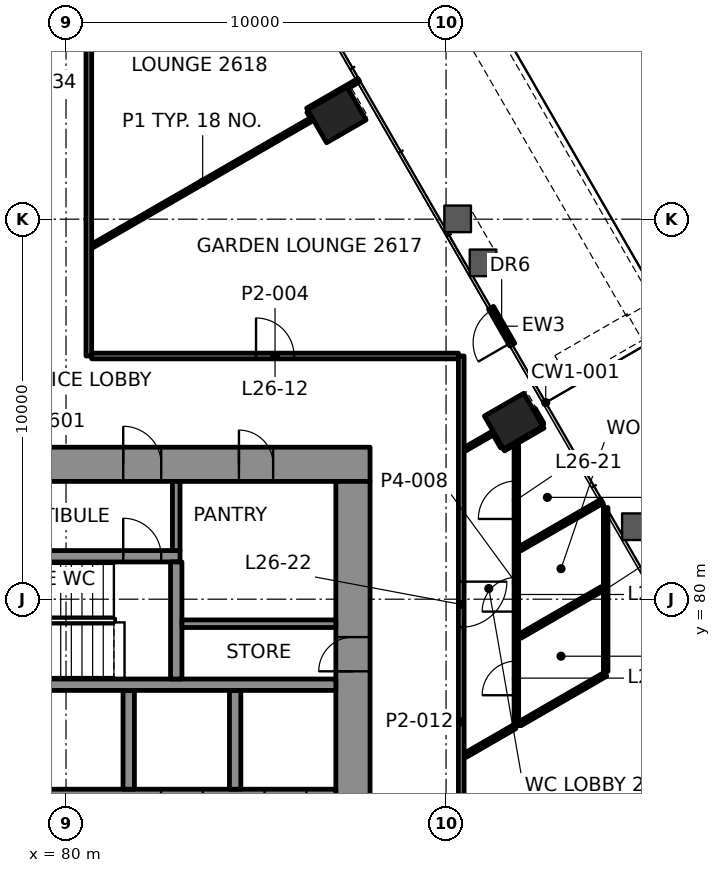
"""IFC4 building model, lengths in metres.
Left out: names, types, materials, properties, quantities, classifications, styles, units other than length and angle.
Written with IfcOpenShell. Run it as: python <this file> out.ifc"""

import sys

from ifc_helpers import new_model, si_unit, direction, frame, frame_2d, origin, origin_2d, place, context, subcontext, project, spatial, rectangle, extrude, element, fill, save


model = new_model("IFC4")
c1 = context("Model", 3, precision=1e-05, world=origin(), true_north=direction((0.0, 1.0)))
c2 = subcontext(c1, "Body", "Model", "MODEL_VIEW")
j1 = project(units=[si_unit("LENGTHUNIT", "METRE"), si_unit("PLANEANGLEUNIT", "RADIAN")], contexts=[c1])
p1 = place(None, origin())
s1 = spatial("IfcSite", under=j1, at=p1, CompositionType="ELEMENT")
p2 = place(p1, origin())
s2 = spatial("IfcBuilding", under=s1, at=p2, CompositionType="ELEMENT")
p3 = place(p2, frame((0.0, 0.0, 115.6)))
s3 = spatial("IfcBuildingStorey", under=s2, at=p3, CompositionType="ELEMENT", Elevation=115.6)
for number, where, z_axis, x_axis in (
    (1, (91.778, 84.687, -0.0), (0.0, 0.0, 1.0), (-0.5, 0.866, 0.0)),
    (2, (87.126, 92.745, -0.0), (0.0, 0.0, 1.0), (-0.5, 0.866, 0.0)),
):
    element("IfcColumn", number, at=place(p3, frame(where, z_axis=z_axis, x_axis=x_axis)), inside=s3, PredefinedType="COLUMN", context=c2, shape_type="SweptSolid", body=[
        extrude(rectangle(XDim=1.0, YDim=1.2, at=origin_2d()), origin(), (0.0, 0.0, 1.0), 4.2),
    ])
p4 = place(p3, frame((62.9, 83.55, 0.0), z_axis=(0.0, 0.0, 1.0), x_axis=(1.0, 0.0, 0.0)))
e3 = element("IfcWall", 3, at=p4, inside=s3, PredefinedType="SHEAR", context=c2, shape_type="SweptSolid", body=[
    extrude(rectangle(XDim=25.1, YDim=0.9, at=frame_2d((12.55, 0.0))), origin(), (0.0, 0.0, 1.0), 4.0),
])
p5 = place(p4, frame((4.795, 0.0, 0.0)))
e4 = element("IfcOpeningElement", 4, at=p5, cuts=e3, PredefinedType="OPENING", context=c2, shape_type="SweptSolid", body=[
    extrude(rectangle(XDim=1.0, YDim=2.1, at=frame_2d((0.5, 1.05))), frame((0.0, 0.46, 0.0), z_axis=(0.0, -1.0, 0.0), x_axis=(1.0, 0.0, 0.0)), (0.0, 0.0, 1.0), 0.92),
])
p6 = place(p4, frame((18.605, 0.0, 0.0)))
e5 = element("IfcOpeningElement", 5, at=p6, cuts=e3, PredefinedType="OPENING", context=c2, shape_type="SweptSolid", body=[
    extrude(rectangle(XDim=1.0, YDim=2.1, at=frame_2d((0.5, 1.05))), frame((0.0, 0.46, 0.0), z_axis=(0.0, -1.0, 0.0), x_axis=(1.0, 0.0, 0.0)), (0.0, 0.0, 1.0), 0.92),
])
p7 = place(p4, frame((2.55, 0.0, 0.0)))
e6 = element("IfcOpeningElement", 6, at=p7, cuts=e3, PredefinedType="OPENING", context=c2, shape_type="SweptSolid", body=[
    extrude(rectangle(XDim=0.9, YDim=2.1, at=frame_2d((0.45, 1.05))), frame((0.0, 0.46, 0.0), z_axis=(0.0, -1.0, 0.0), x_axis=(1.0, 0.0, 0.0)), (0.0, 0.0, 1.0), 0.92),
])
p8 = place(p4, frame((11.75, 0.0, 0.0)))
e7 = element("IfcOpeningElement", 7, at=p8, cuts=e3, PredefinedType="OPENING", context=c2, shape_type="SweptSolid", body=[
    extrude(rectangle(XDim=0.9, YDim=2.1, at=frame_2d((0.45, 1.05))), frame((0.0, 0.46, 0.0), z_axis=(0.0, -1.0, 0.0), x_axis=(1.0, 0.0, 0.0)), (0.0, 0.0, 1.0), 0.92),
])
p9 = place(p4, frame((21.65, 0.0, 0.0)))
e8 = element("IfcOpeningElement", 8, at=p9, cuts=e3, PredefinedType="OPENING", context=c2, shape_type="SweptSolid", body=[
    extrude(rectangle(XDim=0.9, YDim=2.1, at=frame_2d((0.45, 1.05))), frame((0.0, 0.46, 0.0), z_axis=(0.0, -1.0, 0.0), x_axis=(1.0, 0.0, 0.0)), (0.0, 0.0, 1.0), 0.92),
])
p10 = place(p3, frame((87.55, 66.9, 0.0), z_axis=(0.0, 0.0, 1.0), x_axis=(0.0, 1.0, 0.0)))
e9 = element("IfcWall", 9, at=p10, inside=s3, PredefinedType="SHEAR", context=c2, shape_type="SweptSolid", body=[
    extrude(rectangle(XDim=16.2, YDim=0.9, at=frame_2d((8.1, 0.0))), origin(), (0.0, 0.0, 1.0), 4.0),
])
p11 = place(p10, frame((5.5, 0.0, 0.0)))
e10 = element("IfcOpeningElement", 10, at=p11, cuts=e9, PredefinedType="OPENING", context=c2, shape_type="SweptSolid", body=[
    extrude(rectangle(XDim=1.8, YDim=2.1, at=frame_2d((0.9, 1.05))), frame((0.0, 0.46, 0.0), z_axis=(0.0, -1.0, 0.0), x_axis=(1.0, 0.0, 0.0)), (0.0, 0.0, 1.0), 0.92),
])
p12 = place(p10, frame((11.202, 0.0, 0.0)))
e11 = element("IfcOpeningElement", 11, at=p12, cuts=e9, PredefinedType="OPENING", context=c2, shape_type="SweptSolid", body=[
    extrude(rectangle(XDim=0.9, YDim=2.1, at=frame_2d((0.45, 1.05))), frame((0.0, 0.46, 0.0), z_axis=(0.0, -1.0, 0.0), x_axis=(1.0, 0.0, 0.0)), (0.0, 0.0, 1.0), 0.92),
])
p13 = place(p3, frame((70.3, 74.85, 0.0), z_axis=(0.0, 0.0, 1.0), x_axis=(1.0, 0.0, 0.0)))
e12 = element("IfcWall", 12, at=p13, inside=s3, PredefinedType="SHEAR", context=c2, shape_type="SweptSolid", body=[
    extrude(rectangle(XDim=16.8, YDim=0.3, at=frame_2d((8.4, 0.0))), origin(), (0.0, 0.0, 1.0), 4.0),
])
p14 = place(p13, frame((3.8, 0.0, 0.0)))
e13 = element("IfcOpeningElement", 13, at=p14, cuts=e12, PredefinedType="OPENING", context=c2, shape_type="SweptSolid", body=[
    extrude(rectangle(XDim=1.1, YDim=2.1, at=frame_2d((0.55, 1.05))), frame((0.0, 0.16, 0.0), z_axis=(0.0, -1.0, 0.0), x_axis=(1.0, 0.0, 0.0)), (0.0, 0.0, 1.0), 0.32),
])
p15 = place(p13, frame((12.2, 0.0, 0.0)))
e14 = element("IfcOpeningElement", 14, at=p15, cuts=e12, PredefinedType="OPENING", context=c2, shape_type="SweptSolid", body=[
    extrude(rectangle(XDim=1.1, YDim=2.1, at=frame_2d((0.55, 1.05))), frame((0.0, 0.16, 0.0), z_axis=(0.0, -1.0, 0.0), x_axis=(1.0, 0.0, 0.0)), (0.0, 0.0, 1.0), 0.32),
])
p16 = place(p13, frame((14.925, 0.0, 0.0)))
e15 = element("IfcOpeningElement", 15, at=p16, cuts=e12, PredefinedType="OPENING", context=c2, shape_type="SweptSolid", body=[
    extrude(rectangle(XDim=1.1, YDim=2.1, at=frame_2d((0.55, 1.05))), frame((0.0, 0.16, 0.0), z_axis=(0.0, -1.0, 0.0), x_axis=(1.0, 0.0, 0.0)), (0.0, 0.0, 1.0), 0.32),
])
for number, where, z_axis, x_axis in (
    (16, (81.65, 75.0, 0.0), (0.0, 0.0, 1.0), (0.0, 1.0, 0.0)),
    (17, (84.45, 75.0, 0.0), (0.0, 0.0, 1.0), (0.0, 1.0, 0.0)),
):
    element("IfcWall", number, at=place(p3, frame(where, z_axis=z_axis, x_axis=x_axis)), inside=s3, PredefinedType="SHEAR", context=c2, shape_type="SweptSolid", body=[
        extrude(rectangle(XDim=2.6, YDim=0.3, at=frame_2d((1.3, 0.0))), origin(), (0.0, 0.0, 1.0), 4.0),
    ])
p17 = place(p3, frame((64.35, 77.75, 0.0), z_axis=(0.0, 0.0, 1.0), x_axis=(1.0, 0.0, 0.0)))
e18 = element("IfcWall", 18, at=p17, inside=s3, PredefinedType="SHEAR", context=c2, shape_type="SweptSolid", body=[
    extrude(rectangle(XDim=22.75, YDim=0.3, at=frame_2d((11.375, 0.0))), origin(), (0.0, 0.0, 1.0), 4.0),
])
p18 = place(p17, frame((3.345, 0.0, 0.0)))
e19 = element("IfcOpeningElement", 19, at=p18, cuts=e18, PredefinedType="OPENING", context=c2, shape_type="SweptSolid", body=[
    extrude(rectangle(XDim=1.0, YDim=2.1, at=frame_2d((0.5, 1.05))), frame((0.0, 0.16, 0.0), z_axis=(0.0, -1.0, 0.0), x_axis=(1.0, 0.0, 0.0)), (0.0, 0.0, 1.0), 0.32),
])
p19 = place(p3, frame((76.14, 81.13, 0.0), z_axis=(0.0, 0.0, 1.0), x_axis=(1.0, 0.0, 0.0)))
e20 = element("IfcWall", 20, at=p19, inside=s3, PredefinedType="SHEAR", context=c2, shape_type="SweptSolid", body=[
    extrude(rectangle(XDim=6.86, YDim=0.3, at=frame_2d((3.43, 0.0))), origin(), (0.0, 0.0, 1.0), 4.0),
])
p20 = place(p19, frame((5.365, 0.0, 0.0)))
e21 = element("IfcOpeningElement", 21, at=p20, cuts=e20, PredefinedType="OPENING", context=c2, shape_type="SweptSolid", body=[
    extrude(rectangle(XDim=1.0, YDim=2.1, at=frame_2d((0.5, 1.05))), frame((0.0, 0.16, 0.0), z_axis=(0.0, -1.0, 0.0), x_axis=(1.0, 0.0, 0.0)), (0.0, 0.0, 1.0), 0.32),
])
p21 = place(p3, frame((82.9, 77.9, 0.0), z_axis=(0.0, 0.0, 1.0), x_axis=(0.0, 1.0, 0.0)))
e22 = element("IfcWall", 22, at=p21, inside=s3, PredefinedType="SHEAR", context=c2, shape_type="SweptSolid", body=[
    extrude(rectangle(XDim=3.08, YDim=0.3, at=frame_2d((1.54, 0.0))), origin(), (0.0, 0.0, 1.0), 4.0),
])
p22 = place(p3, frame((80.675, 86.4, 0.0), z_axis=(0.0, 0.0, 1.0), x_axis=(1.0, 0.0, 0.0)))
e23 = element("IfcWall", 23, at=p22, inside=s3, PredefinedType="PARTITIONING", context=c2, shape_type="SweptSolid", body=[
    extrude(rectangle(XDim=9.649, YDim=0.15, at=frame_2d((4.825, 0.0))), origin(), (0.0, 0.0, 1.0), 3.4),
])
p23 = place(p22, frame((4.325, 0.0, 0.0)))
e24 = element("IfcOpeningElement", 24, at=p23, cuts=e23, PredefinedType="OPENING", context=c2, shape_type="SweptSolid", body=[
    extrude(rectangle(XDim=1.0, YDim=2.1, at=frame_2d((0.5, 1.05))), frame((0.0, 0.085, 0.0), z_axis=(0.0, -1.0, 0.0), x_axis=(1.0, 0.0, 0.0)), (0.0, 0.0, 1.0), 0.17),
])
p24 = place(p3, frame((90.51, 75.896, 0.0), z_axis=(0.0, 0.0, 1.0), x_axis=(0.866055123991, 0.49994851956, 0.0)))
e25 = element("IfcWall", 25, at=p24, inside=s3, PredefinedType="PARTITIONING", context=c2, shape_type="SweptSolid", body=[
    extrude(rectangle(XDim=1.496, YDim=0.12, at=frame_2d((0.748, 0.0))), origin(), (0.0, 0.0, 1.0), 3.4),
])
p25 = place(p3, frame((91.945, 79.027, 0.0), z_axis=(0.0, 0.0, 1.0), x_axis=(0.86603079437, 0.499990663115, 0.0)))
e26 = element("IfcWall", 26, at=p25, inside=s3, PredefinedType="PARTITIONING", context=c2, shape_type="SweptSolid", body=[
    extrude(rectangle(XDim=2.495, YDim=0.12, at=frame_2d((1.248, 0.0))), origin(), (0.0, 0.0, 1.0), 3.4),
])
p26 = place(p3, frame((91.945, 81.329, 0.0), z_axis=(0.0, 0.0, 1.0), x_axis=(0.866024239756, 0.50000201615, 0.0)))
e27 = element("IfcWall", 27, at=p26, inside=s3, PredefinedType="PARTITIONING", context=c2, shape_type="SweptSolid", body=[
    extrude(rectangle(XDim=2.495, YDim=0.12, at=frame_2d((1.247, 0.0))), origin(), (0.0, 0.0, 1.0), 3.165),
])
p27 = place(p3, frame((91.509, 83.954, 0.0), z_axis=(0.0, 0.0, 1.0), x_axis=(0.865905532852, 0.500207565094, 0.0)))
e28 = element("IfcWall", 28, at=p27, inside=s3, PredefinedType="PARTITIONING", context=c2, shape_type="SweptSolid", body=[
    extrude(rectangle(XDim=0.291, YDim=0.12, at=frame_2d((0.145, 0.0))), origin(), (0.0, 0.0, 1.0), 3.4),
])
p28 = place(p3, frame((90.501, 83.95, 0.0), z_axis=(0.0, 0.0, 1.0), x_axis=(0.866069322143, 0.499923923456, 0.0)))
e29 = element("IfcWall", 29, at=p28, inside=s3, PredefinedType="PARTITIONING", context=c2, shape_type="SweptSolid", body=[
    extrude(rectangle(XDim=0.874, YDim=0.1, at=frame_2d((0.437, 0.0))), origin(), (0.0, 0.0, 1.0), 3.4),
])
p29 = place(p3, frame((80.701, 89.302, 0.0), z_axis=(0.0, 0.0, 1.0), x_axis=(0.866032345022, 0.499987977232, 0.0)))
e30 = element("IfcWall", 30, at=p29, inside=s3, PredefinedType="PARTITIONING", context=c2, shape_type="SweptSolid", body=[
    extrude(rectangle(XDim=6.686, YDim=0.1, at=frame_2d((3.343, 0.0))), origin(), (0.0, 0.0, 1.0), 3.4),
])
p30 = place(p3, frame((86.356, 92.879, 0.0), z_axis=(0.0, 0.0, 1.0), x_axis=(0.866018739521, 0.500011542666, 0.0)))
e31 = element("IfcWall", 31, at=p30, inside=s3, PredefinedType="PARTITIONING", context=c2, shape_type="SweptSolid", body=[
    extrude(rectangle(XDim=1.56, YDim=0.1, at=frame_2d((0.78, 0.0))), origin(), (0.0, 0.0, 1.0), 3.165),
])
p31 = place(p3, frame((94.2, 78.096, 0.0), z_axis=(0.0, 0.0, 1.0), x_axis=(0.0, 1.0, 0.0)))
e32 = element("IfcWall", 32, at=p31, inside=s3, PredefinedType="PARTITIONING", context=c2, shape_type="SweptSolid", body=[
    extrude(rectangle(XDim=4.316, YDim=0.12, at=frame_2d((2.158, 0.0))), origin(), (0.0, 0.0, 1.0), 3.165),
])
p32 = place(p3, frame((91.85, 76.67, 0.0), z_axis=(0.0, 0.0, 1.0), x_axis=(0.0, 1.0, 0.0)))
e33 = element("IfcWall", 33, at=p32, inside=s3, PredefinedType="PARTITIONING", context=c2, shape_type="SweptSolid", body=[
    extrude(rectangle(XDim=7.481, YDim=0.12, at=frame_2d((3.741, 0.0))), origin(), (0.0, 0.0, 1.0), 3.4),
])
p33 = place(p32, frame((0.803, 0.0, 0.0)))
e34 = element("IfcOpeningElement", 34, at=p33, cuts=e33, PredefinedType="OPENING", context=c2, shape_type="SweptSolid", body=[
    extrude(rectangle(XDim=0.9, YDim=2.1, at=frame_2d((0.45, 1.05))), frame((0.0, 0.07, 0.0), z_axis=(0.0, -1.0, 0.0), x_axis=(1.0, 0.0, 0.0)), (0.0, 0.0, 1.0), 0.14),
])
p34 = place(p32, frame((3.004, 0.0, 0.0)))
e35 = element("IfcOpeningElement", 35, at=p34, cuts=e33, PredefinedType="OPENING", context=c2, shape_type="SweptSolid", body=[
    extrude(rectangle(XDim=0.9, YDim=2.1, at=frame_2d((0.45, 1.05))), frame((0.0, 0.07, 0.0), z_axis=(0.0, -1.0, 0.0), x_axis=(1.0, 0.0, 0.0)), (0.0, 0.0, 1.0), 0.14),
])
p35 = place(p32, frame((5.441, 0.0, 0.0)))
e36 = element("IfcOpeningElement", 36, at=p35, cuts=e33, PredefinedType="OPENING", context=c2, shape_type="SweptSolid", body=[
    extrude(rectangle(XDim=1.0, YDim=2.1, at=frame_2d((0.5, 1.05))), frame((0.0, 0.07, 0.0), z_axis=(0.0, -1.0, 0.0), x_axis=(1.0, 0.0, 0.0)), (0.0, 0.0, 1.0), 0.14),
])
p36 = place(p3, frame((90.4, 86.399, 0.0), z_axis=(0.0, 0.0, 1.0), x_axis=(0.0, -1.0, 0.0)))
e37 = element("IfcWall", 37, at=p36, inside=s3, PredefinedType="PARTITIONING", context=c2, shape_type="SweptSolid", body=[
    extrude(rectangle(XDim=19.251, YDim=0.15, at=frame_2d((9.626, 0.0))), origin(), (0.0, 0.0, 1.0), 3.4),
])
p37 = place(p36, frame((5.937, 0.0, 0.0)))
e38 = element("IfcOpeningElement", 38, at=p37, cuts=e37, PredefinedType="OPENING", context=c2, shape_type="SweptSolid", body=[
    extrude(rectangle(XDim=1.2, YDim=2.1, at=frame_2d((0.6, 1.05))), frame((0.0, 0.085, 0.0), z_axis=(0.0, -1.0, 0.0), x_axis=(1.0, 0.0, 0.0)), (0.0, 0.0, 1.0), 0.17),
])
p38 = place(p36, frame((14.207, 0.0, 0.0)))
e39 = element("IfcOpeningElement", 39, at=p38, cuts=e37, PredefinedType="OPENING", context=c2, shape_type="SweptSolid", body=[
    extrude(rectangle(XDim=1.2, YDim=2.1, at=frame_2d((0.6, 1.05))), frame((0.0, 0.085, 0.0), z_axis=(0.0, -1.0, 0.0), x_axis=(1.0, 0.0, 0.0)), (0.0, 0.0, 1.0), 0.17),
])
p39 = place(p3, frame((80.6, 86.4, 0.0), z_axis=(0.0, 0.0, 1.0), x_axis=(0.0, 1.0, 0.0)))
e40 = element("IfcWall", 40, at=p39, inside=s3, PredefinedType="PARTITIONING", context=c2, shape_type="SweptSolid", body=[
    extrude(rectangle(XDim=10.6, YDim=0.15, at=frame_2d((5.3, 0.0))), origin(), (0.0, 0.0, 1.0), 3.322),
])
p40 = place(p3, frame((92.518, 84.606, 0.0), z_axis=(0.0, 0.0, 1.0), x_axis=(-0.499962889934, 0.866046828231, 0.0)))
e41 = element("IfcWall", 41, at=p40, inside=s3, PredefinedType="PARTITIONING", context=c2, shape_type="SweptSolid", body=[
    extrude(rectangle(XDim=0.439, YDim=0.12, at=frame_2d((0.22, 0.0))), origin(), (0.0, 0.0, 1.0), 3.4),
])
p41 = place(p3, frame((91.479, 84.006, 0.0), z_axis=(0.0, 0.0, 1.0), x_axis=(-0.499649997908, 0.866227383307, 0.0)))
e42 = element("IfcWall", 42, at=p41, inside=s3, PredefinedType="PARTITIONING", context=c2, shape_type="SweptSolid", body=[
    extrude(rectangle(XDim=0.389, YDim=0.1, at=frame_2d((0.194, 0.0))), origin(), (0.0, 0.0, 1.0), 3.4),
])
p42 = place(p3, frame((86.466, 92.688, 0.0), z_axis=(0.0, 0.0, 1.0), x_axis=(-0.500013496215, 0.866017611601, 0.0)))
e43 = element("IfcWall", 43, at=p42, inside=s3, PredefinedType="PARTITIONING", context=c2, shape_type="SweptSolid", body=[
    extrude(rectangle(XDim=0.169, YDim=0.1, at=frame_2d((0.085, 0.0))), origin(), (0.0, 0.0, 1.0), 3.4),
])
p43 = place(p3, frame((91.94, 76.722, 0.0), z_axis=(0.0, 0.0, 1.0), x_axis=(0.866006422342, 0.500032875382, 0.0)))
e44 = element("IfcWall", 44, at=p43, inside=s3, PredefinedType="PARTITIONING", context=c2, shape_type="SweptSolid", body=[
    extrude(rectangle(XDim=2.61, YDim=0.12, at=frame_2d((1.305, 0.0))), origin(), (0.0, 0.0, 1.0), 3.4),
])
p44 = place(p3, frame((91.895, 84.177, 0.0), z_axis=(0.0, 0.0, 1.0), x_axis=(0.865980481111, 0.500077800282, 0.0)))
e45 = element("IfcWall", 45, at=p44, inside=s3, PredefinedType="PARTITIONING", context=c2, shape_type="SweptSolid", body=[
    extrude(rectangle(XDim=0.753, YDim=0.12, at=frame_2d((0.377, 0.0))), origin(), (0.0, 0.0, 1.0), 3.165),
])
p45 = place(p3, frame((93.062, 86.063, 0.0), z_axis=(0.0, 0.0, 1.0), x_axis=(0.86605622881, 0.499946605688, 0.0)))
e46 = element("IfcWall", 46, at=p45, inside=s3, PredefinedType="SOLIDWALL", context=c2, shape_type="SweptSolid", body=[
    extrude(rectangle(XDim=2.2, YDim=0.8, at=frame_2d((1.1, 0.0))), origin(), (0.0, 0.0, 1.0), 0.9),
])
p46 = place(p3, frame((95.095, 87.641, 0.0), z_axis=(0.0, 0.0, 1.0), x_axis=(-0.500002252739, 0.866024103161, 0.0)))
e47 = element("IfcWall", 47, at=p46, inside=s3, PredefinedType="SOLIDWALL", context=c2, shape_type="SweptSolid", body=[
    extrude(rectangle(XDim=28.425, YDim=0.8, at=frame_2d((14.212, 0.0))), origin(), (0.0, 0.0, 1.0), 0.9),
])
p47 = place(p3, frame((83.05, 79.355, 0.0), z_axis=(0.0, 0.0, 1.0), x_axis=(1.0, 0.0, 0.0)))
e48 = element("IfcWall", 48, at=p47, inside=s3, PredefinedType="PARTITIONING", context=c2, shape_type="SweptSolid", body=[
    extrude(rectangle(XDim=4.05, YDim=0.2, at=frame_2d((2.025, 0.0))), origin(), (0.0, 0.0, 1.0), 4.0),
])
p48 = place(p3, frame((82.9, 81.28, 0.0), z_axis=(0.0, 0.0, 1.0), x_axis=(0.0, 1.0, 0.0)))
e49 = element("IfcWall", 49, at=p48, inside=s3, PredefinedType="PARTITIONING", context=c2, shape_type="SweptSolid", body=[
    extrude(rectangle(XDim=1.82, YDim=0.2, at=frame_2d((0.91, 0.0))), origin(), (0.0, 0.0, 1.0), 4.0),
])
p49 = place(p23, origin())
e50 = element("IfcDoor", 50, at=p49, inside=s3, OperationType="SINGLE_SWING_RIGHT", PredefinedType="DOOR", context=c2, shape_type="SweptSolid", body=[
    extrude(rectangle(XDim=1.0, YDim=2.1, at=frame_2d((0.5, 1.05))), frame((0.0, 0.025, 0.0), z_axis=(0.0, -1.0, 0.0), x_axis=(1.0, 0.0, 0.0)), (0.0, 0.0, 1.0), 0.05),
])
fill(e24, e50)
p50 = place(p33, origin())
e51 = element("IfcDoor", 51, at=p50, inside=s3, OperationType="SINGLE_SWING_LEFT", PredefinedType="DOOR", context=c2, shape_type="SweptSolid", body=[
    extrude(rectangle(XDim=0.9, YDim=2.1, at=frame_2d((0.45, 1.05))), frame((0.0, 0.025, 0.0), z_axis=(0.0, -1.0, 0.0), x_axis=(1.0, 0.0, 0.0)), (0.0, 0.0, 1.0), 0.05),
])
fill(e34, e51)
p51 = place(p34, origin())
e52 = element("IfcDoor", 52, at=p51, inside=s3, OperationType="SINGLE_SWING_RIGHT", PredefinedType="DOOR", context=c2, shape_type="SweptSolid", body=[
    extrude(rectangle(XDim=0.9, YDim=2.1, at=frame_2d((0.45, 1.05))), frame((0.0, 0.025, 0.0), z_axis=(0.0, -1.0, 0.0), x_axis=(1.0, 0.0, 0.0)), (0.0, 0.0, 1.0), 0.05),
])
fill(e35, e52)
p52 = place(p35, origin())
e53 = element("IfcDoor", 53, at=p52, inside=s3, OperationType="SINGLE_SWING_LEFT", PredefinedType="DOOR", context=c2, shape_type="SweptSolid", body=[
    extrude(rectangle(XDim=1.0, YDim=2.1, at=frame_2d((0.5, 1.05))), frame((0.0, 0.025, 0.0), z_axis=(0.0, -1.0, 0.0), x_axis=(1.0, 0.0, 0.0)), (0.0, 0.0, 1.0), 0.05),
])
fill(e36, e53)
p53 = place(p37, origin())
e54 = element("IfcDoor", 54, at=p53, inside=s3, OperationType="DOUBLE_DOOR_SINGLE_SWING", PredefinedType="DOOR", context=c2, shape_type="SweptSolid", body=[
    extrude(rectangle(XDim=1.2, YDim=2.1, at=frame_2d((0.6, 1.05))), frame((0.0, 0.025, 0.0), z_axis=(0.0, -1.0, 0.0), x_axis=(1.0, 0.0, 0.0)), (0.0, 0.0, 1.0), 0.05),
])
fill(e38, e54)
p54 = place(p3, frame((91.742, 86.698, 0.0), z_axis=(0.0, 0.0, 1.0), x_axis=(-0.499867132655, 0.866102101193, 0.0)))
p55 = place(p54, frame((0.06, 0.0, 0.0)))
p56 = place(p55, origin())
e55 = element("IfcDoor", 55, at=p56, inside=s3, OperationType="SINGLE_SWING_LEFT", PredefinedType="DOOR", context=c2, shape_type="SweptSolid", body=[
    extrude(rectangle(XDim=1.0, YDim=2.1, at=frame_2d((0.5, 1.05))), frame((0.0, 0.025, 0.0), z_axis=(0.0, -1.0, 0.0), x_axis=(1.0, 0.0, 0.0)), (0.0, 0.0, 1.0), 0.05),
])
p57 = place(p20, origin())
e56 = element("IfcDoor", 56, at=p57, inside=s3, OperationType="SINGLE_SWING_RIGHT", PredefinedType="DOOR", context=c2, shape_type="SweptSolid", body=[
    extrude(rectangle(XDim=1.0, YDim=2.1, at=frame_2d((0.5, 1.05))), frame((0.0, 0.025, 0.0), z_axis=(0.0, -1.0, 0.0), x_axis=(1.0, 0.0, 0.0)), (0.0, 0.0, 1.0), 0.05),
])
fill(e21, e56)
p58 = place(p6, origin())
e57 = element("IfcDoor", 57, at=p58, inside=s3, OperationType="SINGLE_SWING_LEFT", PredefinedType="DOOR", context=c2, shape_type="SweptSolid", body=[
    extrude(rectangle(XDim=1.0, YDim=2.1, at=frame_2d((0.5, 1.05))), frame((0.0, 0.17, 0.0), z_axis=(0.0, -1.0, 0.0), x_axis=(1.0, 0.0, 0.0)), (0.0, 0.0, 1.0), 0.34),
])
fill(e5, e57)
p59 = place(p12, origin())
e58 = element("IfcDoor", 58, at=p59, inside=s3, OperationType="SINGLE_SWING_RIGHT", PredefinedType="DOOR", context=c2, shape_type="SweptSolid", body=[
    extrude(rectangle(XDim=0.9, YDim=2.1, at=frame_2d((0.45, 1.05))), frame((0.0, 0.17, 0.0), z_axis=(0.0, -1.0, 0.0), x_axis=(1.0, 0.0, 0.0)), (0.0, 0.0, 1.0), 0.34),
])
fill(e11, e58)
p60 = place(p9, origin())
e59 = element("IfcDoor", 59, at=p60, inside=s3, OperationType="SINGLE_SWING_LEFT", PredefinedType="DOOR", context=c2, shape_type="SweptSolid", body=[
    extrude(rectangle(XDim=0.9, YDim=2.1, at=frame_2d((0.45, 1.05))), frame((0.0, 0.17, 0.0), z_axis=(0.0, -1.0, 0.0), x_axis=(1.0, 0.0, 0.0)), (0.0, 0.0, 1.0), 0.34),
])
fill(e8, e59)
save(model, sys.argv[1])
